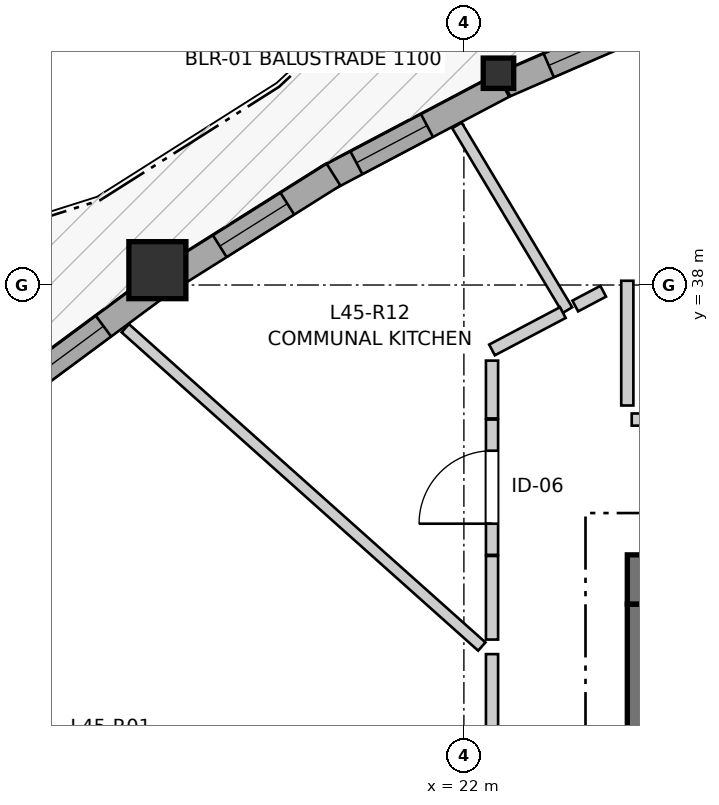
"""IFC4 building model, lengths in metres.
Left out: names, types, materials, properties, quantities, classifications, styles, units other than length and angle.
Written with IfcOpenShell. Run it as: python <this file> out.ifc"""

import sys

from ifc_helpers import new_model, si_unit, direction, frame, frame_2d, origin, origin_2d, place, context, subcontext, project, spatial, rectangle, i_section, extrude, source, transform, mapped, element, fill, save


model = new_model("IFC4")
c1 = context("Model", 3, precision=1e-05, world=origin(), true_north=direction((0.0, 1.0)))
c2 = subcontext(c1, "Body", "Model", "MODEL_VIEW")
j1 = project(units=[si_unit("LENGTHUNIT", "METRE"), si_unit("PLANEANGLEUNIT", "RADIAN")], contexts=[c1])
p1 = place(None, origin())
s1 = spatial("IfcSite", under=j1, at=p1, CompositionType="ELEMENT")
p2 = place(p1, origin())
s2 = spatial("IfcBuilding", under=s1, at=p2, CompositionType="ELEMENT")
p3 = place(p2, frame((0.0, 0.0, 152.2)))
s3 = spatial("IfcBuildingStorey", under=s2, at=p3, CompositionType="ELEMENT", Elevation=152.2)
p4 = place(p3, frame((36.55, 34.125, 0.0), z_axis=(0.0, 0.0, 1.0), x_axis=(-1.0, 0.0, 0.0)))
e1 = element("IfcWall", 1, at=p4, inside=s3, PredefinedType="SHEAR", context=c2, shape_type="SweptSolid", body=[
    extrude(rectangle(XDim=12.4, YDim=0.65, at=frame_2d((6.2, 0.0))), origin(), (0.0, 0.0, 1.0), 2.935),
])
p5 = place(p3, frame((24.475, 33.8, 0.0), z_axis=(0.0, 0.0, 1.0), x_axis=(0.0, -1.0, 0.0)))
e2 = element("IfcWall", 2, at=p5, inside=s3, PredefinedType="SHEAR", context=c2, shape_type="SweptSolid", body=[
    extrude(rectangle(XDim=15.6, YDim=0.65, at=frame_2d((7.8, 0.0))), origin(), (0.0, 0.0, 1.0), 2.935),
])
p6 = place(p5, frame((7.05, 0.0, 0.0)))
e3 = element("IfcOpeningElement", 3, at=p6, cuts=e2, PredefinedType="OPENING", context=c2, shape_type="SweptSolid", body=[
    extrude(rectangle(XDim=1.5, YDim=2.15, at=frame_2d((0.75, 1.075))), frame((0.0, 0.335, 0.0), z_axis=(0.0, -1.0, 0.0), x_axis=(1.0, 0.0, 0.0)), (0.0, 0.0, 1.0), 0.67),
])
p7 = place(p5, frame((3.52, 0.0, 0.0)))
e4 = element("IfcOpeningElement", 4, at=p7, cuts=e2, PredefinedType="OPENING", context=c2, shape_type="SweptSolid", body=[
    extrude(rectangle(XDim=0.86, YDim=2.05, at=frame_2d((0.43, 1.025))), frame((0.0, 0.335, 0.0), z_axis=(0.0, -1.0, 0.0), x_axis=(1.0, 0.0, 0.0)), (0.0, 0.0, 1.0), 0.67),
])
p8 = place(p5, frame((11.22, 0.0, 0.0)))
e5 = element("IfcOpeningElement", 5, at=p8, cuts=e2, PredefinedType="OPENING", context=c2, shape_type="SweptSolid", body=[
    extrude(rectangle(XDim=0.86, YDim=2.05, at=frame_2d((0.43, 1.025))), frame((0.0, 0.335, 0.0), z_axis=(0.0, -1.0, 0.0), x_axis=(1.0, 0.0, 0.0)), (0.0, 0.0, 1.0), 0.67),
])
m1 = source(origin(), c2, "Body", "SweptSolid", [
    extrude(i_section(OverallWidth=0.401, OverallDepth=0.399, WebThickness=0.023, FlangeThickness=0.036, FilletRadius=0.015, at=origin_2d()), origin(), (0.0, 0.0, 1.0), 2.935),
])
p9 = place(p3, frame((22.455, 40.786, 0.0), z_axis=(0.0, 0.0, 1.0), x_axis=(1.0, 0.0, 0.0)))
e6 = element("IfcColumn", 6, at=p9, inside=s3, PredefinedType="PILASTER", context=c2, shape_type="MappedRepresentation", body=[
    mapped(m1, transform((0.0, 0.0, 0.0), x_axis=(1.0, 0.0, 0.0), y_axis=(0.0, 1.0, 0.0), z_axis=(0.0, 0.0, 1.0), scale=1.0)),
])
m2 = source(origin(), c2, "Body", "SweptSolid", [
    extrude(rectangle(XDim=0.75, YDim=0.75, at=origin_2d()), origin(), (0.0, 0.0, 1.0), 2.935),
])
p10 = place(p3, frame((17.967, 38.195, 0.0), z_axis=(0.0, 0.0, 1.0), x_axis=(1.0, 0.0, 0.0)))
e7 = element("IfcColumn", 7, at=p10, inside=s3, PredefinedType="COLUMN", context=c2, shape_type="MappedRepresentation", body=[
    mapped(m2, transform((0.0, 0.0, 0.0), x_axis=(1.0, 0.0, 0.0), y_axis=(0.0, 1.0, 0.0), z_axis=(0.0, 0.0, 1.0), scale=1.0)),
])
p11 = place(p3, frame((24.949, 41.685, 0.0), z_axis=(0.0, 0.0, 1.0), x_axis=(-0.917112921707, -0.398627506373, 0.0)))
e8 = element("IfcWall", 8, at=p11, inside=s3, PredefinedType="SOLIDWALL", context=c2, shape_type="SweptSolid", body=[
    extrude(rectangle(XDim=2.625, YDim=0.34, at=frame_2d((1.313, 0.0))), origin(), (0.0, 0.0, 1.0), 2.515),
])
p12 = place(p11, frame((0.648, 0.0, 0.82)))
e9 = element("IfcOpeningElement", 9, at=p12, cuts=e8, PredefinedType="OPENING", context=c2, shape_type="SweptSolid", body=[
    extrude(rectangle(XDim=1.35, YDim=1.45, at=frame_2d((0.675, 0.725))), frame((0.0, 0.18, 0.0), z_axis=(0.0, -1.0, 0.0), x_axis=(1.0, 0.0, 0.0)), (0.0, 0.0, 1.0), 0.36),
])
p13 = place(p3, frame((22.517, 40.627, 0.0), z_axis=(0.0, 0.0, 1.0), x_axis=(-0.884374030812, -0.466778934427, 0.0)))
e10 = element("IfcWall", 10, at=p13, inside=s3, PredefinedType="SOLIDWALL", context=c2, shape_type="SweptSolid", body=[
    extrude(rectangle(XDim=2.611, YDim=0.34, at=frame_2d((1.306, 0.0))), origin(), (0.0, 0.0, 1.0), 2.515),
])
p14 = place(p13, frame((1.133, 0.0, 0.82)))
e11 = element("IfcOpeningElement", 11, at=p14, cuts=e10, PredefinedType="OPENING", context=c2, shape_type="SweptSolid", body=[
    extrude(rectangle(XDim=1.05, YDim=1.45, at=frame_2d((0.525, 0.725))), frame((0.0, 0.18, 0.0), z_axis=(0.0, -1.0, 0.0), x_axis=(1.0, 0.0, 0.0)), (0.0, 0.0, 1.0), 0.36),
])
p15 = place(p3, frame((20.284, 39.452, 0.0), z_axis=(0.0, 0.0, 1.0), x_axis=(-0.846415587119, -0.532522913951, 0.0)))
e12 = element("IfcWall", 12, at=p15, inside=s3, PredefinedType="SOLIDWALL", context=c2, shape_type="SweptSolid", body=[
    extrude(rectangle(XDim=2.476, YDim=0.34, at=frame_2d((1.238, 0.0))), origin(), (0.0, 0.0, 1.0), 2.515),
])
p16 = place(p15, frame((0.718, 0.0, 0.82)))
e13 = element("IfcOpeningElement", 13, at=p16, cuts=e12, PredefinedType="OPENING", context=c2, shape_type="SweptSolid", body=[
    extrude(rectangle(XDim=1.05, YDim=1.45, at=frame_2d((0.525, 0.725))), frame((0.0, 0.18, 0.0), z_axis=(0.0, -1.0, 0.0), x_axis=(1.0, 0.0, 0.0)), (0.0, 0.0, 1.0), 0.36),
])
p17 = place(p3, frame((17.944, 37.967, 0.0), z_axis=(0.0, 0.0, 1.0), x_axis=(-0.803795025682, -0.594906342788, 0.0)))
e14 = element("IfcWall", 14, at=p17, inside=s3, PredefinedType="SOLIDWALL", context=c2, shape_type="SweptSolid", body=[
    extrude(rectangle(XDim=2.491, YDim=0.34, at=frame_2d((1.245, 0.0))), origin(), (0.0, 0.0, 1.0), 2.515),
])
p18 = place(p17, frame((0.853, 0.0, 0.82)))
e15 = element("IfcOpeningElement", 15, at=p18, cuts=e14, PredefinedType="OPENING", context=c2, shape_type="SweptSolid", body=[
    extrude(rectangle(XDim=1.35, YDim=1.45, at=frame_2d((0.675, 0.725))), frame((0.0, 0.18, 0.0), z_axis=(0.0, -1.0, 0.0), x_axis=(1.0, 0.0, 0.0)), (0.0, 0.0, 1.0), 0.36),
])
p19 = place(p3, frame((24.208, 36.23, 0.0), z_axis=(0.0, 0.0, 1.0), x_axis=(1.0, 0.0, 0.0)))
e16 = element("IfcWall", 16, at=p19, inside=s3, PredefinedType="PARTITIONING", context=c2, shape_type="SweptSolid", body=[
    extrude(rectangle(XDim=5.832, YDim=0.16, at=frame_2d((2.916, 0.0))), origin(), (0.0, 0.0, 1.0), 2.935),
])
p20 = place(p19, frame((2.438, 0.0, 0.0)))
e17 = element("IfcOpeningElement", 17, at=p20, cuts=e16, PredefinedType="OPENING", context=c2, shape_type="SweptSolid", body=[
    extrude(rectangle(XDim=0.96, YDim=2.1, at=frame_2d((0.48, 1.05))), frame((0.0, 0.09, 0.0), z_axis=(0.0, -1.0, 0.0), x_axis=(1.0, 0.0, 0.0)), (0.0, 0.0, 1.0), 0.18),
])
p21 = place(p3, frame((22.37, 27.85, 0.0), z_axis=(0.0, 0.0, 1.0), x_axis=(0.0, 1.0, 0.0)))
e18 = element("IfcWall", 18, at=p21, inside=s3, PredefinedType="PARTITIONING", context=c2, shape_type="SweptSolid", body=[
    extrude(rectangle(XDim=5.294, YDim=0.16, at=frame_2d((2.647, 0.0))), origin(), (0.0, 0.0, 1.0), 2.935),
])
p22 = place(p21, frame((2.341, 0.0, 0.0)))
e19 = element("IfcOpeningElement", 19, at=p22, cuts=e18, PredefinedType="OPENING", context=c2, shape_type="SweptSolid", body=[
    extrude(rectangle(XDim=1.3, YDim=2.1, at=frame_2d((0.65, 1.05))), frame((0.0, 0.09, 0.0), z_axis=(0.0, -1.0, 0.0), x_axis=(1.0, 0.0, 0.0)), (0.0, 0.0, 1.0), 0.18),
])
p23 = place(p3, frame((22.37, 34.45, 0.0), z_axis=(0.0, 0.0, 1.0), x_axis=(0.0, 1.0, 0.0)))
e20 = element("IfcWall", 20, at=p23, inside=s3, PredefinedType="PARTITIONING", context=c2, shape_type="SweptSolid", body=[
    extrude(rectangle(XDim=1.78, YDim=0.16, at=frame_2d((0.89, 0.0))), origin(), (0.0, 0.0, 1.0), 2.935),
])
p24 = place(p23, frame((0.41, 0.0, 0.0)))
e21 = element("IfcOpeningElement", 21, at=p24, cuts=e20, PredefinedType="OPENING", context=c2, shape_type="SweptSolid", body=[
    extrude(rectangle(XDim=0.96, YDim=2.1, at=frame_2d((0.48, 1.05))), frame((0.0, 0.09, 0.0), z_axis=(0.0, -1.0, 0.0), x_axis=(1.0, 0.0, 0.0)), (0.0, 0.0, 1.0), 0.18),
])
p25 = place(p3, frame((17.545, 37.432, 0.0), z_axis=(0.0, 0.0, 1.0), x_axis=(0.745965905636, -0.665984134668, 0.0)))
e22 = element("IfcWall", 22, at=p25, inside=s3, PredefinedType="PARTITIONING", context=c2, shape_type="SweptSolid", body=[
    extrude(rectangle(XDim=6.288, YDim=0.145, at=frame_2d((3.144, 0.0))), origin(), (0.0, 0.0, 1.0), 2.935),
])
p26 = place(p3, frame((21.908, 40.1, 0.0), z_axis=(0.0, 0.0, 1.0), x_axis=(0.513582752497, -0.85804006686, 0.0)))
e23 = element("IfcWall", 23, at=p26, inside=s3, PredefinedType="PARTITIONING", context=c2, shape_type="SweptSolid", body=[
    extrude(rectangle(XDim=2.832, YDim=0.145, at=frame_2d((1.416, 0.0))), origin(), (0.0, 0.0, 1.0), 2.935),
])
p27 = place(p3, frame((24.15, 36.415, 0.0), z_axis=(0.0, 0.0, 1.0), x_axis=(0.0, 1.0, 0.0)))
e24 = element("IfcWall", 24, at=p27, inside=s3, PredefinedType="PARTITIONING", context=c2, shape_type="SweptSolid", body=[
    extrude(rectangle(XDim=1.641, YDim=0.16, at=frame_2d((0.82, 0.0))), origin(), (0.0, 0.0, 1.0), 2.935),
])
p28 = place(p3, frame((22.37, 33.336, 0.0), z_axis=(0.0, 0.0, 1.0), x_axis=(0.0, 1.0, 0.0)))
e25 = element("IfcWall", 25, at=p28, inside=s3, PredefinedType="PARTITIONING", context=c2, shape_type="SweptSolid", body=[
    extrude(rectangle(XDim=1.099, YDim=0.16, at=frame_2d((0.55, 0.0))), origin(), (0.0, 0.0, 1.0), 2.935),
])
p29 = place(p3, frame((22.37, 37.146, 0.0), z_axis=(0.0, 0.0, 1.0), x_axis=(0.884530854714, 0.46648168995, 0.0)))
e26 = element("IfcWall", 26, at=p29, inside=s3, PredefinedType="PARTITIONING", context=c2, shape_type="SweptSolid", body=[
    extrude(rectangle(XDim=1.053, YDim=0.16, at=frame_2d((0.527, 0.0))), origin(), (0.0, 0.0, 1.0), 2.543),
])
p30 = place(p3, frame((22.37, 36.245, 0.0), z_axis=(0.0, 0.0, 1.0), x_axis=(0.0, 1.0, 0.0)))
e27 = element("IfcWall", 27, at=p30, inside=s3, PredefinedType="PARTITIONING", context=c2, shape_type="SweptSolid", body=[
    extrude(rectangle(XDim=0.76, YDim=0.16, at=frame_2d((0.38, 0.0))), origin(), (0.0, 0.0, 1.0), 2.935),
])
p31 = place(p3, frame((23.465, 37.724, 0.0), z_axis=(0.0, 0.0, 1.0), x_axis=(0.884344349775, 0.466835164722, 0.0)))
e28 = element("IfcWall", 28, at=p31, inside=s3, PredefinedType="PARTITIONING", context=c2, shape_type="SweptSolid", body=[
    extrude(rectangle(XDim=0.416, YDim=0.16, at=frame_2d((0.208, 0.0))), origin(), (0.0, 0.0, 1.0), 2.543),
])
m3 = source(origin(), c2, "Body", "SweptSolid", [
    extrude(rectangle(XDim=1.35, YDim=1.45, at=frame_2d((0.675, 0.725))), frame((0.0, 0.03, 0.0), z_axis=(0.0, -1.0, 0.0), x_axis=(1.0, 0.0, 0.0)), (0.0, 0.0, 1.0), 0.06),
])
p32 = place(p12, origin())
e29 = element("IfcWindow", 29, at=p32, inside=s3, PartitioningType="SINGLE_PANEL", PredefinedType="WINDOW", context=c2, shape_type="MappedRepresentation", body=[
    mapped(m3, transform((0.0, 0.0, 0.0), x_axis=(1.0, 0.0, 0.0), y_axis=(0.0, 1.0, 0.0), z_axis=(0.0, 0.0, 1.0), scale=1.0)),
])
fill(e9, e29)
m4 = source(origin(), c2, "Body", "SweptSolid", [
    extrude(rectangle(XDim=1.05, YDim=1.45, at=frame_2d((0.525, 0.725))), frame((0.0, 0.03, 0.0), z_axis=(0.0, -1.0, 0.0), x_axis=(1.0, 0.0, 0.0)), (0.0, 0.0, 1.0), 0.06),
])
p33 = place(p14, origin())
e30 = element("IfcWindow", 30, at=p33, inside=s3, PartitioningType="SINGLE_PANEL", PredefinedType="WINDOW", context=c2, shape_type="MappedRepresentation", body=[
    mapped(m4, transform((0.0, 0.0, 0.0), x_axis=(1.0, 0.0, 0.0), y_axis=(0.0, 1.0, 0.0), z_axis=(0.0, 0.0, 1.0), scale=1.0)),
])
fill(e11, e30)
p34 = place(p16, origin())
e31 = element("IfcWindow", 31, at=p34, inside=s3, PartitioningType="SINGLE_PANEL", PredefinedType="WINDOW", context=c2, shape_type="MappedRepresentation", body=[
    mapped(m4, transform((0.0, 0.0, 0.0), x_axis=(1.0, 0.0, 0.0), y_axis=(0.0, 1.0, 0.0), z_axis=(0.0, 0.0, 1.0), scale=1.0)),
])
fill(e13, e31)
p35 = place(p18, origin())
e32 = element("IfcWindow", 32, at=p35, inside=s3, PartitioningType="SINGLE_PANEL", PredefinedType="WINDOW", context=c2, shape_type="MappedRepresentation", body=[
    mapped(m3, transform((0.0, 0.0, 0.0), x_axis=(1.0, 0.0, 0.0), y_axis=(0.0, 1.0, 0.0), z_axis=(0.0, 0.0, 1.0), scale=1.0)),
])
fill(e15, e32)
m5 = source(origin(), c2, "Body", "SweptSolid", [
    extrude(rectangle(XDim=0.96, YDim=2.1, at=frame_2d((0.48, 1.05))), frame((0.0, 0.025, 0.0), z_axis=(0.0, -1.0, 0.0), x_axis=(1.0, 0.0, 0.0)), (0.0, 0.0, 1.0), 0.05),
])
p36 = place(p24, origin())
e33 = element("IfcDoor", 33, at=p36, inside=s3, OperationType="SINGLE_SWING_LEFT", PredefinedType="DOOR", context=c2, shape_type="MappedRepresentation", body=[
    mapped(m5, transform((0.0, 0.0, 0.0), x_axis=(1.0, 0.0, 0.0), y_axis=(0.0, 1.0, 0.0), z_axis=(0.0, 0.0, 1.0), scale=1.0)),
])
fill(e21, e33)
save(model, sys.argv[1])
